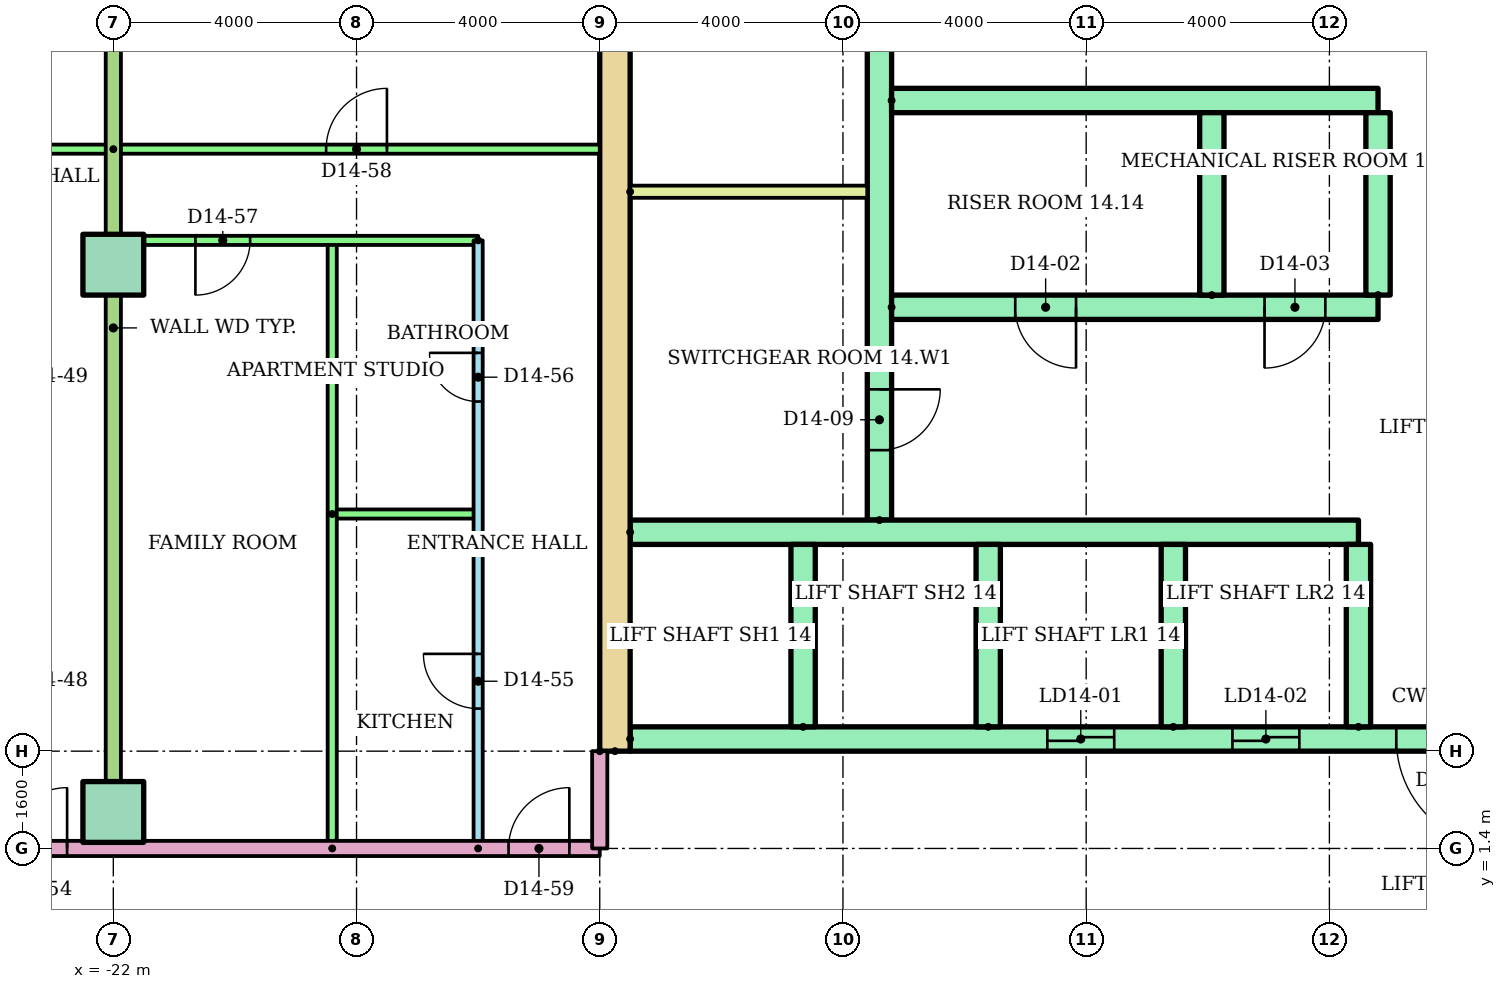
"""IFC4 building model, lengths in metres.
Left out: names, types, materials, properties, quantities, classifications, styles, units other than length and angle.
Written with IfcOpenShell. Run it as: python <this file> out.ifc"""

import sys

from ifc_helpers import new_model, si_unit, direction, frame, frame_2d, origin, origin_2d, place, context, subcontext, project, spatial, rectangle, extrude, element, fill, save


model = new_model("IFC4")
c1 = context("Model", 3, precision=1e-05, world=origin(), true_north=direction((0.0, 1.0)))
c2 = subcontext(c1, "Body", "Model", "MODEL_VIEW")
j1 = project(units=[si_unit("LENGTHUNIT", "METRE"), si_unit("PLANEANGLEUNIT", "RADIAN")], contexts=[c1])
p1 = place(None, origin())
s1 = spatial("IfcSite", under=j1, at=p1, CompositionType="ELEMENT")
p2 = place(p1, origin())
s2 = spatial("IfcBuilding", under=s1, at=p2, CompositionType="ELEMENT")
p3 = place(p2, frame((0.0, 0.0, 54.4)))
s3 = spatial("IfcBuildingStorey", under=s2, at=p3, CompositionType="ELEMENT", Elevation=54.4)
for number, where in (
    (1, (-22.0, 2.0, 0.0)),
    (2, (-22.0, 11.0, 0.0)),
):
    element("IfcColumn", number, at=place(p3, frame(where)), inside=s3, PredefinedType="COLUMN", context=c2, shape_type="SweptSolid", body=[
        extrude(rectangle(XDim=1.0, YDim=1.0, at=origin_2d()), origin(), (0.0, 0.0, 1.0), 3.2),
    ])
p4 = place(p3, frame((-13.75, 3.0, 0.0), z_axis=(0.0, 0.0, 1.0), x_axis=(0.0, 1.0, 0.0)))
e3 = element("IfcWall", 3, at=p4, inside=s3, PredefinedType="SHEAR", context=c2, shape_type="SweptSolid", body=[
    extrude(rectangle(XDim=17.0, YDim=0.5, at=frame_2d((8.5, 0.0))), origin(), (0.0, 0.0, 1.0), 2.92),
])
p5 = place(p3, frame((-9.4, 6.8, 0.0), z_axis=(0.0, 0.0, 1.0), x_axis=(0.0, 1.0, 0.0)))
e4 = element("IfcWall", 4, at=p5, inside=s3, PredefinedType="SHEAR", context=c2, shape_type="SweptSolid", body=[
    extrude(rectangle(XDim=12.7, YDim=0.4, at=frame_2d((6.35, 0.0))), origin(), (0.0, 0.0, 1.0), 2.92),
])
p6 = place(p5, frame((1.15, 0.0, 0.0)))
e5 = element("IfcOpeningElement", 5, at=p6, cuts=e4, PredefinedType="OPENING", context=c2, shape_type="SweptSolid", body=[
    extrude(rectangle(XDim=1.0, YDim=2.1, at=frame_2d((0.5, 1.05))), frame((0.0, 0.21, 0.0), z_axis=(0.0, -1.0, 0.0), x_axis=(1.0, 0.0, 0.0)), (0.0, 0.0, 1.0), 0.42),
])
p7 = place(p5, frame((7.925, 0.0, 0.0)))
e6 = element("IfcOpeningElement", 6, at=p7, cuts=e4, PredefinedType="OPENING", context=c2, shape_type="SweptSolid", body=[
    extrude(rectangle(XDim=1.0, YDim=2.1, at=frame_2d((0.5, 1.05))), frame((0.0, 0.21, 0.0), z_axis=(0.0, -1.0, 0.0), x_axis=(1.0, 0.0, 0.0)), (0.0, 0.0, 1.0), 0.42),
])
p8 = place(p3, frame((-13.5, 3.2, 0.0)))
e7 = element("IfcWall", 7, at=p8, inside=s3, PredefinedType="SHEAR", context=c2, shape_type="SweptSolid", body=[
    extrude(rectangle(XDim=27.0, YDim=0.4, at=frame_2d((13.5, 0.0))), origin(), (0.0, 0.0, 1.0), 2.92),
])
p9 = place(p8, frame((6.861, 0.0, 0.0)))
e8 = element("IfcOpeningElement", 8, at=p9, cuts=e7, PredefinedType="OPENING", context=c2, shape_type="SweptSolid", body=[
    extrude(rectangle(XDim=1.1, YDim=2.1, at=frame_2d((0.55, 1.05))), frame((0.0, 0.21, 0.0), z_axis=(0.0, -1.0, 0.0), x_axis=(1.0, 0.0, 0.0)), (0.0, 0.0, 1.0), 0.42),
])
p10 = place(p8, frame((9.906, 0.0, 0.0)))
e9 = element("IfcOpeningElement", 9, at=p10, cuts=e7, PredefinedType="OPENING", context=c2, shape_type="SweptSolid", body=[
    extrude(rectangle(XDim=1.1, YDim=2.1, at=frame_2d((0.55, 1.05))), frame((0.0, 0.21, 0.0), z_axis=(0.0, -1.0, 0.0), x_axis=(1.0, 0.0, 0.0)), (0.0, 0.0, 1.0), 0.42),
])
p11 = place(p8, frame((15.994, 0.0, 0.0)))
e10 = element("IfcOpeningElement", 10, at=p11, cuts=e7, PredefinedType="OPENING", context=c2, shape_type="SweptSolid", body=[
    extrude(rectangle(XDim=1.1, YDim=2.1, at=frame_2d((0.55, 1.05))), frame((0.0, 0.21, 0.0), z_axis=(0.0, -1.0, 0.0), x_axis=(1.0, 0.0, 0.0)), (0.0, 0.0, 1.0), 0.42),
])
p12 = place(p8, frame((19.039, 0.0, 0.0)))
e11 = element("IfcOpeningElement", 11, at=p12, cuts=e7, PredefinedType="OPENING", context=c2, shape_type="SweptSolid", body=[
    extrude(rectangle(XDim=1.1, YDim=2.1, at=frame_2d((0.55, 1.05))), frame((0.0, 0.21, 0.0), z_axis=(0.0, -1.0, 0.0), x_axis=(1.0, 0.0, 0.0)), (0.0, 0.0, 1.0), 0.42),
])
p13 = place(p8, frame((12.6, 0.0, 0.0)))
e12 = element("IfcOpeningElement", 12, at=p13, cuts=e7, PredefinedType="OPENING", context=c2, shape_type="SweptSolid", body=[
    extrude(rectangle(XDim=1.8, YDim=2.1, at=frame_2d((0.9, 1.05))), frame((0.0, 0.21, 0.0), z_axis=(0.0, -1.0, 0.0), x_axis=(1.0, 0.0, 0.0)), (0.0, 0.0, 1.0), 0.42),
])
p14 = place(p3, frame((-13.5, 6.6, 0.0)))
e13 = element("IfcWall", 13, at=p14, inside=s3, PredefinedType="SHEAR", context=c2, shape_type="SweptSolid", body=[
    extrude(rectangle(XDim=11.978, YDim=0.4, at=frame_2d((5.989, 0.0))), origin(), (0.0, 0.0, 1.0), 2.92),
])
for number, where, z_axis, x_axis in (
    (14, (-10.656, 3.4, 0.0), (0.0, 0.0, 1.0), (0.0, 1.0, 0.0)),
    (15, (-7.611, 3.4, 0.0), (0.0, 0.0, 1.0), (0.0, 1.0, 0.0)),
    (16, (-4.567, 3.4, 0.0), (0.0, 0.0, 1.0), (0.0, 1.0, 0.0)),
    (17, (-1.522, 3.4, 0.0), (0.0, 0.0, 1.0), (0.0, 1.0, 0.0)),
):
    element("IfcWall", number, at=place(p3, frame(where, z_axis=z_axis, x_axis=x_axis)), inside=s3, PredefinedType="SHEAR", context=c2, shape_type="SweptSolid", body=[
        extrude(rectangle(XDim=3.0, YDim=0.4, at=frame_2d((1.5, 0.0))), origin(), (0.0, 0.0, 1.0), 2.92),
    ])
p15 = place(p3, frame((-9.2, 10.3, 0.0)))
e18 = element("IfcWall", 18, at=p15, inside=s3, PredefinedType="SHEAR", context=c2, shape_type="SweptSolid", body=[
    extrude(rectangle(XDim=8.0, YDim=0.4, at=frame_2d((4.0, 0.0))), origin(), (0.0, 0.0, 1.0), 2.92),
])
p16 = place(p15, frame((2.033, 0.0, 0.0)))
e19 = element("IfcOpeningElement", 19, at=p16, cuts=e18, PredefinedType="OPENING", context=c2, shape_type="SweptSolid", body=[
    extrude(rectangle(XDim=1.0, YDim=2.1, at=frame_2d((0.5, 1.05))), frame((0.0, 0.21, 0.0), z_axis=(0.0, -1.0, 0.0), x_axis=(1.0, 0.0, 0.0)), (0.0, 0.0, 1.0), 0.42),
])
p17 = place(p15, frame((6.133, 0.0, 0.0)))
e20 = element("IfcOpeningElement", 20, at=p17, cuts=e18, PredefinedType="OPENING", context=c2, shape_type="SweptSolid", body=[
    extrude(rectangle(XDim=1.0, YDim=2.1, at=frame_2d((0.5, 1.05))), frame((0.0, 0.21, 0.0), z_axis=(0.0, -1.0, 0.0), x_axis=(1.0, 0.0, 0.0)), (0.0, 0.0, 1.0), 0.42),
])
p18 = place(p3, frame((-9.2, 13.7, 0.0)))
e21 = element("IfcWall", 21, at=p18, inside=s3, PredefinedType="SHEAR", context=c2, shape_type="SweptSolid", body=[
    extrude(rectangle(XDim=8.0, YDim=0.4, at=frame_2d((4.0, 0.0))), origin(), (0.0, 0.0, 1.0), 2.92),
])
for number, where, z_axis, x_axis in (
    (22, (-3.933, 10.5, 0.0), (0.0, 0.0, 1.0), (0.0, 1.0, 0.0)),
    (23, (-1.2, 10.5, 0.0), (0.0, 0.0, 1.0), (0.0, 1.0, 0.0)),
):
    element("IfcWall", number, at=place(p3, frame(where, z_axis=z_axis, x_axis=x_axis)), inside=s3, PredefinedType="SHEAR", context=c2, shape_type="SweptSolid", body=[
        extrude(rectangle(XDim=3.0, YDim=0.4, at=frame_2d((1.5, 0.0))), origin(), (0.0, 0.0, 1.0), 2.92),
    ])
p19 = place(p3, frame((-13.5, 12.2, 0.0)))
e24 = element("IfcWall", 24, at=p19, inside=s3, PredefinedType="PARTITIONING", context=c2, shape_type="SweptSolid", body=[
    extrude(rectangle(XDim=3.9, YDim=0.2, at=frame_2d((1.95, 0.0))), origin(), (0.0, 0.0, 1.0), 2.92),
])
p20 = place(p3, frame((-36.52, 12.9, 0.0)))
e25 = element("IfcWall", 25, at=p20, inside=s3, PredefinedType="PARTITIONING", context=c2, shape_type="SweptSolid", body=[
    extrude(rectangle(XDim=14.52, YDim=0.15, at=frame_2d((7.26, 0.0))), origin(), (0.0, 0.0, 1.0), 2.4),
])
p21 = place(p20, frame((1.97, 0.0, 0.0)))
e26 = element("IfcOpeningElement", 26, at=p21, cuts=e25, PredefinedType="OPENING", context=c2, shape_type="SweptSolid", body=[
    extrude(rectangle(XDim=1.0, YDim=2.1, at=frame_2d((0.5, 1.05))), frame((0.0, 0.085, 0.0), z_axis=(0.0, -1.0, 0.0), x_axis=(1.0, 0.0, 0.0)), (0.0, 0.0, 1.0), 0.17),
])
p22 = place(p20, frame((9.12, 0.0, 0.0)))
e27 = element("IfcOpeningElement", 27, at=p22, cuts=e25, PredefinedType="OPENING", context=c2, shape_type="SweptSolid", body=[
    extrude(rectangle(XDim=1.0, YDim=2.1, at=frame_2d((0.5, 1.05))), frame((0.0, 0.085, 0.0), z_axis=(0.0, -1.0, 0.0), x_axis=(1.0, 0.0, 0.0)), (0.0, 0.0, 1.0), 0.17),
])
p23 = place(p3, frame((-16.0, 1.4, 0.0), z_axis=(0.0, 0.0, 1.0), x_axis=(0.0, 1.0, 0.0)))
e28 = element("IfcWall", 28, at=p23, inside=s3, PredefinedType="PARTITIONING", context=c2, shape_type="SweptSolid", body=[
    extrude(rectangle(XDim=10.0, YDim=0.15, at=frame_2d((5.0, 0.0))), origin(), (0.0, 0.0, 1.0), 2.4),
])
p24 = place(p23, frame((2.3, 0.0, 0.0)))
e29 = element("IfcOpeningElement", 29, at=p24, cuts=e28, PredefinedType="OPENING", context=c2, shape_type="SweptSolid", body=[
    extrude(rectangle(XDim=0.9, YDim=2.1, at=frame_2d((0.45, 1.05))), frame((0.0, 0.085, 0.0), z_axis=(0.0, -1.0, 0.0), x_axis=(1.0, 0.0, 0.0)), (0.0, 0.0, 1.0), 0.17),
])
p25 = place(p23, frame((7.35, 0.0, 0.0)))
e30 = element("IfcOpeningElement", 30, at=p25, cuts=e28, PredefinedType="OPENING", context=c2, shape_type="SweptSolid", body=[
    extrude(rectangle(XDim=0.8, YDim=2.1, at=frame_2d((0.4, 1.05))), frame((0.0, 0.085, 0.0), z_axis=(0.0, -1.0, 0.0), x_axis=(1.0, 0.0, 0.0)), (0.0, 0.0, 1.0), 0.17),
])
p26 = place(p3, frame((-18.4, 6.9, 0.0)))
e31 = element("IfcWall", 31, at=p26, inside=s3, PredefinedType="PARTITIONING", context=c2, shape_type="SweptSolid", body=[
    extrude(rectangle(XDim=2.4, YDim=0.15, at=frame_2d((1.2, 0.0))), origin(), (0.0, 0.0, 1.0), 2.4),
])
p27 = place(p3, frame((-18.4, 1.4, 0.0), z_axis=(0.0, 0.0, 1.0), x_axis=(0.0, 1.0, 0.0)))
e32 = element("IfcWall", 32, at=p27, inside=s3, PredefinedType="PARTITIONING", context=c2, shape_type="SweptSolid", body=[
    extrude(rectangle(XDim=10.0, YDim=0.15, at=frame_2d((5.0, 0.0))), origin(), (0.0, 0.0, 1.0), 2.4),
])
p28 = place(p3, frame((-16.0, 11.4, 0.0), z_axis=(0.0, 0.0, 1.0), x_axis=(-1.0, 0.0, 0.0)))
e33 = element("IfcWall", 33, at=p28, inside=s3, PredefinedType="PARTITIONING", context=c2, shape_type="SweptSolid", body=[
    extrude(rectangle(XDim=6.0, YDim=0.15, at=frame_2d((3.0, 0.0))), origin(), (0.0, 0.0, 1.0), 2.4),
])
p29 = place(p28, frame((3.75, 0.0, 0.0)))
e34 = element("IfcOpeningElement", 34, at=p29, cuts=e33, PredefinedType="OPENING", context=c2, shape_type="SweptSolid", body=[
    extrude(rectangle(XDim=0.9, YDim=2.1, at=frame_2d((0.45, 1.05))), frame((0.0, 0.085, 0.0), z_axis=(0.0, -1.0, 0.0), x_axis=(1.0, 0.0, 0.0)), (0.0, 0.0, 1.0), 0.17),
])
p30 = place(p3, frame((-22.0, 12.9, 0.0)))
e35 = element("IfcWall", 35, at=p30, inside=s3, PredefinedType="PARTITIONING", context=c2, shape_type="SweptSolid", body=[
    extrude(rectangle(XDim=8.0, YDim=0.15, at=frame_2d((4.0, 0.0))), origin(), (0.0, 0.0, 1.0), 2.4),
])
p31 = place(p30, frame((3.5, 0.0, 0.0)))
e36 = element("IfcOpeningElement", 36, at=p31, cuts=e35, PredefinedType="OPENING", context=c2, shape_type="SweptSolid", body=[
    extrude(rectangle(XDim=1.0, YDim=2.1, at=frame_2d((0.5, 1.05))), frame((0.0, 0.085, 0.0), z_axis=(0.0, -1.0, 0.0), x_axis=(1.0, 0.0, 0.0)), (0.0, 0.0, 1.0), 0.17),
])
p32 = place(p3, frame((-22.0, 18.521, 0.0), z_axis=(0.0, 0.0, 1.0), x_axis=(0.0, -1.0, 0.0)))
e37 = element("IfcWall", 37, at=p32, inside=s3, PredefinedType="PARTITIONING", context=c2, shape_type="SweptSolid", body=[
    extrude(rectangle(XDim=17.121, YDim=0.25, at=frame_2d((8.561, 0.0))), origin(), (0.0, 0.0, 1.0), 2.4),
])
p33 = place(p3, frame((-29.0, 1.4, 0.0)))
e38 = element("IfcWall", 38, at=p33, inside=s3, PredefinedType="PARTITIONING", context=c2, shape_type="SweptSolid", body=[
    extrude(rectangle(XDim=15.0, YDim=0.25, at=frame_2d((7.5, 0.0))), origin(), (0.0, 0.0, 1.0), 2.4),
])
p34 = place(p33, frame((5.24, 0.0, 0.0)))
e39 = element("IfcOpeningElement", 39, at=p34, cuts=e38, PredefinedType="OPENING", context=c2, shape_type="SweptSolid", body=[
    extrude(rectangle(XDim=1.0, YDim=2.1, at=frame_2d((0.5, 1.05))), frame((0.0, 0.135, 0.0), z_axis=(0.0, -1.0, 0.0), x_axis=(1.0, 0.0, 0.0)), (0.0, 0.0, 1.0), 0.27),
])
p35 = place(p33, frame((13.5, 0.0, 0.0)))
e40 = element("IfcOpeningElement", 40, at=p35, cuts=e38, PredefinedType="OPENING", context=c2, shape_type="SweptSolid", body=[
    extrude(rectangle(XDim=1.0, YDim=2.1, at=frame_2d((0.5, 1.05))), frame((0.0, 0.135, 0.0), z_axis=(0.0, -1.0, 0.0), x_axis=(1.0, 0.0, 0.0)), (0.0, 0.0, 1.0), 0.27),
])
p36 = place(p3, frame((-14.0, 3.0, 0.0), z_axis=(0.0, 0.0, 1.0), x_axis=(0.0, -1.0, 0.0)))
e41 = element("IfcWall", 41, at=p36, inside=s3, PredefinedType="PARTITIONING", context=c2, shape_type="SweptSolid", body=[
    extrude(rectangle(XDim=1.6, YDim=0.25, at=frame_2d((0.8, 0.0))), origin(), (0.0, 0.0, 1.0), 2.4),
])
p37 = place(p9, origin())
e42 = element("IfcDoor", 42, at=p37, inside=s3, OperationType="SLIDING_TO_LEFT", PredefinedType="DOOR", context=c2, shape_type="SweptSolid", body=[
    extrude(rectangle(XDim=1.1, YDim=2.1, at=frame_2d((0.55, 1.05))), frame((0.0, 0.025, 0.0), z_axis=(0.0, -1.0, 0.0), x_axis=(1.0, 0.0, 0.0)), (0.0, 0.0, 1.0), 0.05),
])
fill(e8, e42)
p38 = place(p10, origin())
e43 = element("IfcDoor", 43, at=p38, inside=s3, OperationType="SLIDING_TO_LEFT", PredefinedType="DOOR", context=c2, shape_type="SweptSolid", body=[
    extrude(rectangle(XDim=1.1, YDim=2.1, at=frame_2d((0.55, 1.05))), frame((0.0, 0.025, 0.0), z_axis=(0.0, -1.0, 0.0), x_axis=(1.0, 0.0, 0.0)), (0.0, 0.0, 1.0), 0.05),
])
fill(e9, e43)
p39 = place(p13, frame((1.8, 0.0, 0.0), z_axis=(0.0, 0.0, 1.0), x_axis=(-1.0, 0.0, 0.0)))
e44 = element("IfcDoor", 44, at=p39, inside=s3, OperationType="DOUBLE_DOOR_SINGLE_SWING", PredefinedType="DOOR", context=c2, shape_type="SweptSolid", body=[
    extrude(rectangle(XDim=1.8, YDim=2.1, at=frame_2d((0.9, 1.05))), frame((0.0, 0.025, 0.0), z_axis=(0.0, -1.0, 0.0), x_axis=(1.0, 0.0, 0.0)), (0.0, 0.0, 1.0), 0.05),
])
fill(e12, e44)
p40 = place(p16, frame((1.0, 0.0, 0.0), z_axis=(0.0, 0.0, 1.0), x_axis=(-1.0, 0.0, 0.0)))
e45 = element("IfcDoor", 45, at=p40, inside=s3, OperationType="SINGLE_SWING_RIGHT", PredefinedType="DOOR", context=c2, shape_type="SweptSolid", body=[
    extrude(rectangle(XDim=1.0, YDim=2.1, at=frame_2d((0.5, 1.05))), frame((0.0, 0.025, 0.0), z_axis=(0.0, -1.0, 0.0), x_axis=(1.0, 0.0, 0.0)), (0.0, 0.0, 1.0), 0.05),
])
fill(e19, e45)
p41 = place(p17, frame((1.0, 0.0, 0.0), z_axis=(0.0, 0.0, 1.0), x_axis=(-1.0, 0.0, 0.0)))
e46 = element("IfcDoor", 46, at=p41, inside=s3, OperationType="SINGLE_SWING_LEFT", PredefinedType="DOOR", context=c2, shape_type="SweptSolid", body=[
    extrude(rectangle(XDim=1.0, YDim=2.1, at=frame_2d((0.5, 1.05))), frame((0.0, 0.025, 0.0), z_axis=(0.0, -1.0, 0.0), x_axis=(1.0, 0.0, 0.0)), (0.0, 0.0, 1.0), 0.05),
])
fill(e20, e46)
p42 = place(p6, frame((1.0, 0.0, 0.0), z_axis=(0.0, 0.0, 1.0), x_axis=(-1.0, 0.0, 0.0)))
e47 = element("IfcDoor", 47, at=p42, inside=s3, OperationType="SINGLE_SWING_RIGHT", PredefinedType="DOOR", context=c2, shape_type="SweptSolid", body=[
    extrude(rectangle(XDim=1.0, YDim=2.1, at=frame_2d((0.5, 1.05))), frame((0.0, 0.025, 0.0), z_axis=(0.0, -1.0, 0.0), x_axis=(1.0, 0.0, 0.0)), (0.0, 0.0, 1.0), 0.05),
])
fill(e5, e47)
p43 = place(p34, origin())
e48 = element("IfcDoor", 48, at=p43, inside=s3, OperationType="SINGLE_SWING_RIGHT", PredefinedType="DOOR", context=c2, shape_type="SweptSolid", body=[
    extrude(rectangle(XDim=1.0, YDim=2.1, at=frame_2d((0.5, 1.05))), frame((0.0, 0.025, 0.0), z_axis=(0.0, -1.0, 0.0), x_axis=(1.0, 0.0, 0.0)), (0.0, 0.0, 1.0), 0.05),
])
fill(e39, e48)
p44 = place(p24, origin())
e49 = element("IfcDoor", 49, at=p44, inside=s3, OperationType="SINGLE_SWING_RIGHT", PredefinedType="DOOR", context=c2, shape_type="SweptSolid", body=[
    extrude(rectangle(XDim=0.9, YDim=2.1, at=frame_2d((0.45, 1.05))), frame((0.0, 0.025, 0.0), z_axis=(0.0, -1.0, 0.0), x_axis=(1.0, 0.0, 0.0)), (0.0, 0.0, 1.0), 0.05),
])
fill(e29, e49)
p45 = place(p25, origin())
e50 = element("IfcDoor", 50, at=p45, inside=s3, OperationType="SINGLE_SWING_RIGHT", PredefinedType="DOOR", context=c2, shape_type="SweptSolid", body=[
    extrude(rectangle(XDim=0.8, YDim=2.1, at=frame_2d((0.4, 1.05))), frame((0.0, 0.025, 0.0), z_axis=(0.0, -1.0, 0.0), x_axis=(1.0, 0.0, 0.0)), (0.0, 0.0, 1.0), 0.05),
])
fill(e30, e50)
p46 = place(p29, origin())
e51 = element("IfcDoor", 51, at=p46, inside=s3, OperationType="SINGLE_SWING_RIGHT", PredefinedType="DOOR", context=c2, shape_type="SweptSolid", body=[
    extrude(rectangle(XDim=0.9, YDim=2.1, at=frame_2d((0.45, 1.05))), frame((0.0, 0.025, 0.0), z_axis=(0.0, -1.0, 0.0), x_axis=(1.0, 0.0, 0.0)), (0.0, 0.0, 1.0), 0.05),
])
fill(e34, e51)
p47 = place(p31, origin())
e52 = element("IfcDoor", 52, at=p47, inside=s3, OperationType="SINGLE_SWING_RIGHT", PredefinedType="DOOR", context=c2, shape_type="SweptSolid", body=[
    extrude(rectangle(XDim=1.0, YDim=2.1, at=frame_2d((0.5, 1.05))), frame((0.0, 0.025, 0.0), z_axis=(0.0, -1.0, 0.0), x_axis=(1.0, 0.0, 0.0)), (0.0, 0.0, 1.0), 0.05),
])
fill(e36, e52)
p48 = place(p35, origin())
e53 = element("IfcDoor", 53, at=p48, inside=s3, OperationType="SINGLE_SWING_RIGHT", PredefinedType="DOOR", context=c2, shape_type="SweptSolid", body=[
    extrude(rectangle(XDim=1.0, YDim=2.1, at=frame_2d((0.5, 1.05))), frame((0.0, 0.025, 0.0), z_axis=(0.0, -1.0, 0.0), x_axis=(1.0, 0.0, 0.0)), (0.0, 0.0, 1.0), 0.05),
])
fill(e40, e53)
save(model, sys.argv[1])
